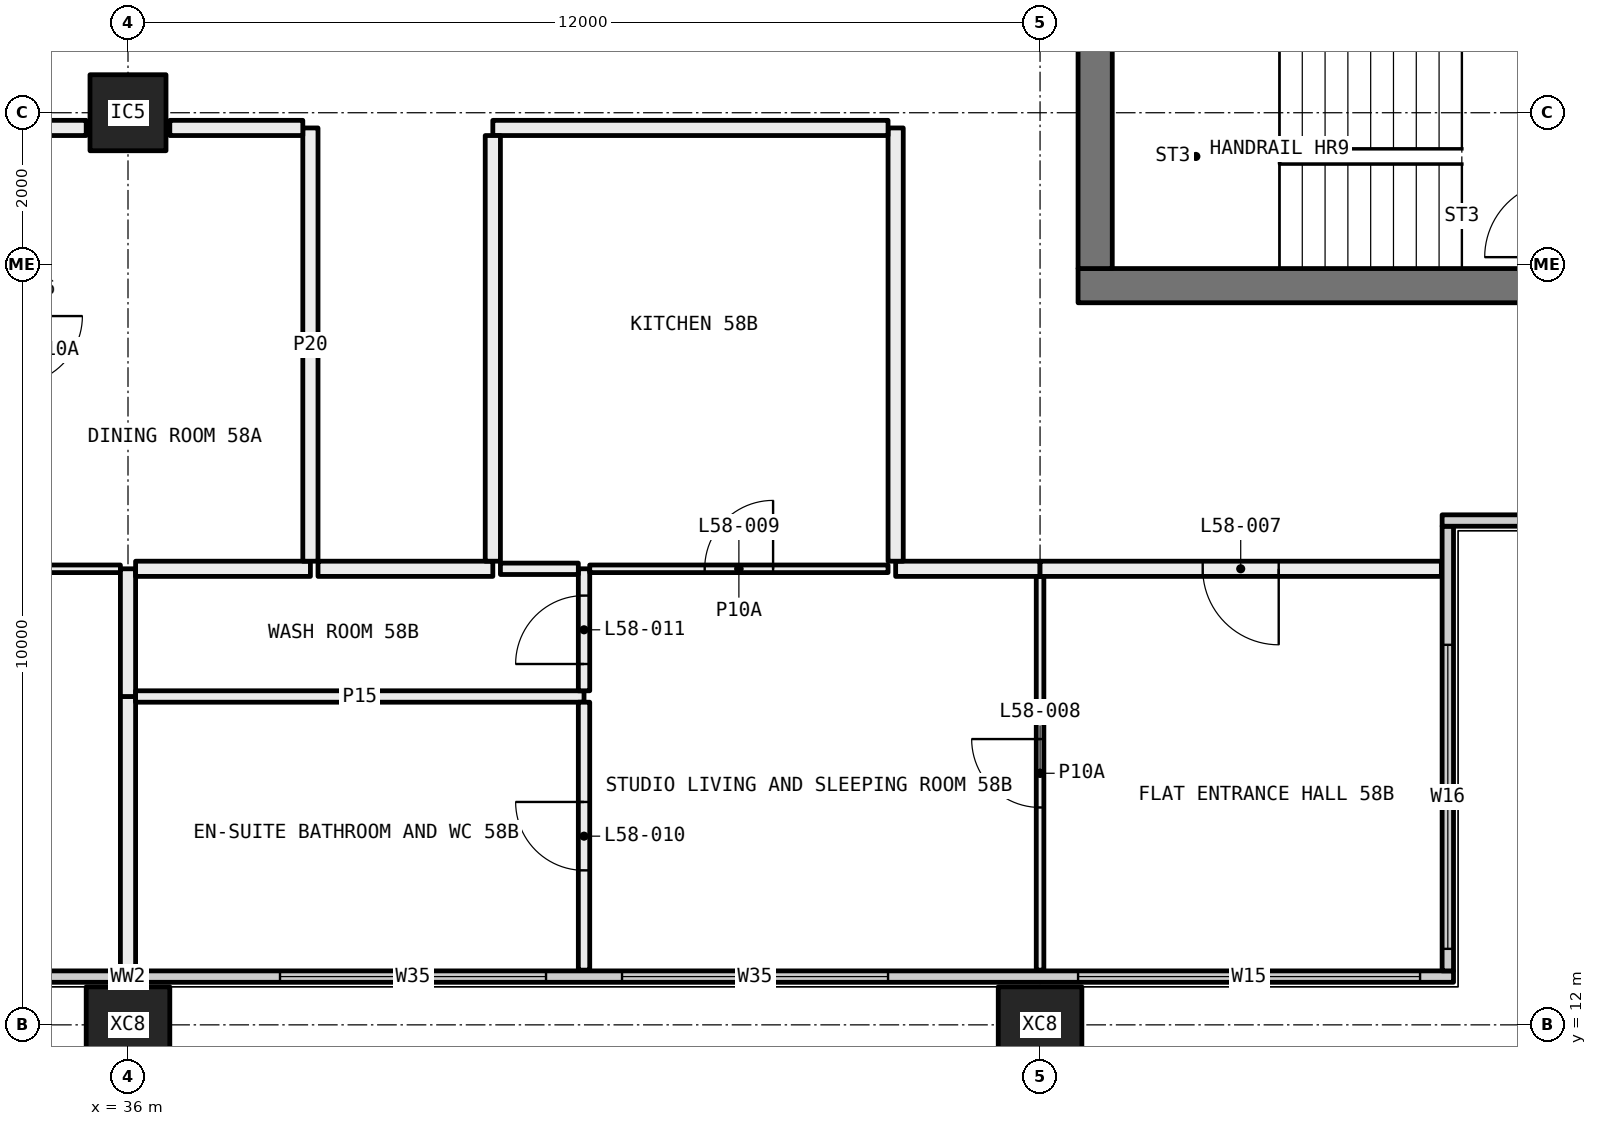
"""IFC4 building model, lengths in metres.
Left out: names, types, materials, properties, quantities, classifications, styles, units other than length and angle.
Written with IfcOpenShell. Run it as: python <this file> out.ifc"""

import sys

from ifc_helpers import new_model, si_unit, direction, frame, frame_2d, origin, origin_2d, place, context, subcontext, project, spatial, rectangle, hollow_rectangle, extrude, element, fill, save


model = new_model("IFC4")
c1 = context("Model", 3, precision=1e-05, world=origin(), true_north=direction((0.0, 1.0)))
c2 = subcontext(c1, "Body", "Model", "MODEL_VIEW")
j1 = project(units=[si_unit("LENGTHUNIT", "METRE"), si_unit("PLANEANGLEUNIT", "RADIAN")], contexts=[c1])
p1 = place(None, origin())
s1 = spatial("IfcSite", under=j1, at=p1, CompositionType="ELEMENT")
p2 = place(p1, origin())
s2 = spatial("IfcBuilding", under=s1, at=p2, CompositionType="ELEMENT")
p3 = place(p2, frame((0.0, 0.0, 217.95)))
s3 = spatial("IfcBuildingStorey", under=s2, at=p3, CompositionType="ELEMENT", Elevation=217.95)
p4 = place(p3, frame((36.0, 12.0, -0.4), z_axis=(0.0, 0.0, 1.0), x_axis=(1.0, 0.0, 0.0)))
e1 = element("IfcColumn", 1, at=p4, inside=s3, PredefinedType="COLUMN", context=c2, shape_type="SweptSolid", body=[
    extrude(hollow_rectangle(XDim=1.1, YDim=1.0, WallThickness=0.04, at=origin_2d()), origin(), (0.0, 0.0, 1.0), 3.45),
])
p5 = place(p3, frame((36.0, 24.0, 0.0), z_axis=(0.0, 0.0, 1.0), x_axis=(1.0, 0.0, 0.0)))
e2 = element("IfcColumn", 2, at=p5, inside=s3, PredefinedType="COLUMN", context=c2, shape_type="SweptSolid", body=[
    extrude(hollow_rectangle(XDim=1.0, YDim=1.0, WallThickness=0.04, at=origin_2d()), origin(), (0.0, 0.0, 1.0), 3.05),
])
p6 = place(p3, frame((48.0, 12.0, -0.4), z_axis=(0.0, 0.0, 1.0), x_axis=(1.0, 0.0, 0.0)))
e3 = element("IfcColumn", 3, at=p6, inside=s3, PredefinedType="COLUMN", context=c2, shape_type="SweptSolid", body=[
    extrude(hollow_rectangle(XDim=1.1, YDim=1.0, WallThickness=0.04, at=origin_2d()), origin(), (0.0, 0.0, 1.0), 3.45),
])
p7 = place(p3, frame((18.56, 12.635, 0.0), z_axis=(0.0, 0.0, 1.0), x_axis=(1.0, 0.0, 0.0)))
e4 = element("IfcWall", 4, at=p7, inside=s3, PredefinedType="ELEMENTEDWALL", context=c2, shape_type="SweptSolid", body=[
    extrude(rectangle(XDim=34.88, YDim=0.15, at=frame_2d((17.44, 0.0))), origin(), (0.0, 0.0, 1.0), 3.05),
])
p8 = place(p7, frame((0.44, 0.0, 0.45)))
e5 = element("IfcOpeningElement", 5, at=p8, cuts=e4, PredefinedType="OPENING", context=c2, shape_type="SweptSolid", body=[
    extrude(rectangle(XDim=4.5, YDim=2.55, at=frame_2d((2.25, 1.275))), frame((0.0, 0.085, 0.0), z_axis=(0.0, -1.0, 0.0), x_axis=(1.0, 0.0, 0.0)), (0.0, 0.0, 1.0), 0.17),
])
p9 = place(p7, frame((7.44, 0.0, 0.45)))
e6 = element("IfcOpeningElement", 6, at=p9, cuts=e4, PredefinedType="OPENING", context=c2, shape_type="SweptSolid", body=[
    extrude(rectangle(XDim=3.5, YDim=2.55, at=frame_2d((1.75, 1.275))), frame((0.0, 0.085, 0.0), z_axis=(0.0, -1.0, 0.0), x_axis=(1.0, 0.0, 0.0)), (0.0, 0.0, 1.0), 0.17),
])
p10 = place(p7, frame((11.94, 0.0, 0.45)))
e7 = element("IfcOpeningElement", 7, at=p10, cuts=e4, PredefinedType="OPENING", context=c2, shape_type="SweptSolid", body=[
    extrude(rectangle(XDim=2.0, YDim=2.55, at=frame_2d((1.0, 1.275))), frame((0.0, 0.085, 0.0), z_axis=(0.0, -1.0, 0.0), x_axis=(1.0, 0.0, 0.0)), (0.0, 0.0, 1.0), 0.17),
])
p11 = place(p7, frame((19.44, 0.0, 0.45)))
e8 = element("IfcOpeningElement", 8, at=p11, cuts=e4, PredefinedType="OPENING", context=c2, shape_type="SweptSolid", body=[
    extrude(rectangle(XDim=3.5, YDim=2.55, at=frame_2d((1.75, 1.275))), frame((0.0, 0.085, 0.0), z_axis=(0.0, -1.0, 0.0), x_axis=(1.0, 0.0, 0.0)), (0.0, 0.0, 1.0), 0.17),
])
p12 = place(p7, frame((23.94, 0.0, 0.45)))
e9 = element("IfcOpeningElement", 9, at=p12, cuts=e4, PredefinedType="OPENING", context=c2, shape_type="SweptSolid", body=[
    extrude(rectangle(XDim=3.5, YDim=2.55, at=frame_2d((1.75, 1.275))), frame((0.0, 0.085, 0.0), z_axis=(0.0, -1.0, 0.0), x_axis=(1.0, 0.0, 0.0)), (0.0, 0.0, 1.0), 0.17),
])
p13 = place(p7, frame((29.94, 0.0, 0.45)))
e10 = element("IfcOpeningElement", 10, at=p13, cuts=e4, PredefinedType="OPENING", context=c2, shape_type="SweptSolid", body=[
    extrude(rectangle(XDim=4.5, YDim=2.55, at=frame_2d((2.25, 1.275))), frame((0.0, 0.085, 0.0), z_axis=(0.0, -1.0, 0.0), x_axis=(1.0, 0.0, 0.0)), (0.0, 0.0, 1.0), 0.17),
])
p14 = place(p3, frame((53.365, 12.71, 0.0), z_axis=(0.0, 0.0, 1.0), x_axis=(0.0, 1.0, 0.0)))
e11 = element("IfcWall", 11, at=p14, inside=s3, PredefinedType="ELEMENTEDWALL", context=c2, shape_type="SweptSolid", body=[
    extrude(rectangle(XDim=5.85, YDim=0.15, at=frame_2d((2.925, 0.0))), origin(), (0.0, 0.0, 1.0), 3.05),
])
p15 = place(p14, frame((0.29, 0.0, 0.45)))
e12 = element("IfcOpeningElement", 12, at=p15, cuts=e11, PredefinedType="OPENING", context=c2, shape_type="SweptSolid", body=[
    extrude(rectangle(XDim=4.0, YDim=2.55, at=frame_2d((2.0, 1.275))), frame((0.0, 0.085, 0.0), z_axis=(0.0, -1.0, 0.0), x_axis=(1.0, 0.0, 0.0)), (0.0, 0.0, 1.0), 0.17),
])
p16 = place(p3, frame((53.29, 18.635, 0.0), z_axis=(0.0, 0.0, 1.0), x_axis=(1.0, 0.0, 0.0)))
e13 = element("IfcWall", 13, at=p16, inside=s3, PredefinedType="ELEMENTEDWALL", context=c2, shape_type="SweptSolid", body=[
    extrude(rectangle(XDim=6.15, YDim=0.15, at=frame_2d((3.075, 0.0))), origin(), (0.0, 0.0, 1.0), 3.05),
])
p17 = place(p16, frame((1.71, 0.0, 0.45)))
e14 = element("IfcOpeningElement", 14, at=p17, cuts=e13, PredefinedType="OPENING", context=c2, shape_type="SweptSolid", body=[
    extrude(rectangle(XDim=4.0, YDim=2.55, at=frame_2d((2.0, 1.275))), frame((0.0, 0.085, 0.0), z_axis=(0.0, -1.0, 0.0), x_axis=(1.0, 0.0, 0.0)), (0.0, 0.0, 1.0), 0.17),
])
p18 = place(p3, frame((35.9, 18.0, 0.0), z_axis=(0.0, 0.0, 1.0), x_axis=(-1.0, 0.0, 0.0)))
e15 = element("IfcWall", 15, at=p18, inside=s3, PredefinedType="PARTITIONING", context=c2, shape_type="SweptSolid", body=[
    extrude(rectangle(XDim=1.4, YDim=0.1, at=frame_2d((0.7, 0.0))), origin(), (0.0, 0.0, 1.0), 3.05),
])
p19 = place(p3, frame((36.0, 12.72, 0.0), z_axis=(0.0, 0.0, 1.0), x_axis=(0.0, 1.0, 0.0)))
e16 = element("IfcWall", 16, at=p19, inside=s3, PredefinedType="PARTITIONING", context=c2, shape_type="SweptSolid", body=[
    extrude(rectangle(XDim=3.6, YDim=0.2, at=frame_2d((1.8, 0.0))), origin(), (0.0, 0.0, 1.0), 2.45),
])
p20 = place(p3, frame((36.0, 16.32, 0.0), z_axis=(0.0, 0.0, 1.0), x_axis=(0.0, 1.0, 0.0)))
e17 = element("IfcWall", 17, at=p20, inside=s3, PredefinedType="PARTITIONING", context=c2, shape_type="SweptSolid", body=[
    extrude(rectangle(XDim=1.68, YDim=0.2, at=frame_2d((0.84, 0.0))), origin(), (0.0, 0.0, 1.0), 2.45),
])
p21 = place(p3, frame((36.1, 18.0, 0.0), z_axis=(0.0, 0.0, 1.0), x_axis=(1.0, 0.0, 0.0)))
e18 = element("IfcWall", 18, at=p21, inside=s3, PredefinedType="PARTITIONING", context=c2, shape_type="SweptSolid", body=[
    extrude(rectangle(XDim=2.3, YDim=0.2, at=frame_2d((1.15, 0.0))), origin(), (0.0, 0.0, 1.0), 3.05),
])
p22 = place(p3, frame((35.45, 23.8, 0.0), z_axis=(0.0, 0.0, 1.0), x_axis=(-1.0, 0.0, 0.0)))
e19 = element("IfcWall", 19, at=p22, inside=s3, PredefinedType="PARTITIONING", context=c2, shape_type="SweptSolid", body=[
    extrude(rectangle(XDim=0.95, YDim=0.2, at=frame_2d((0.475, 0.0))), origin(), (0.0, 0.0, 1.0), 3.05),
])
p23 = place(p3, frame((38.4, 18.1, 0.0), z_axis=(0.0, 0.0, 1.0), x_axis=(0.0, 1.0, 0.0)))
e20 = element("IfcWall", 20, at=p23, inside=s3, PredefinedType="PARTITIONING", context=c2, shape_type="SweptSolid", body=[
    extrude(rectangle(XDim=5.7, YDim=0.2, at=frame_2d((2.85, 0.0))), origin(), (0.0, 0.0, 1.0), 3.05),
])
p24 = place(p3, frame((38.3, 23.8, 0.0), z_axis=(0.0, 0.0, 1.0), x_axis=(-1.0, 0.0, 0.0)))
e21 = element("IfcWall", 21, at=p24, inside=s3, PredefinedType="PARTITIONING", context=c2, shape_type="SweptSolid", body=[
    extrude(rectangle(XDim=1.75, YDim=0.2, at=frame_2d((0.875, 0.0))), origin(), (0.0, 0.0, 1.0), 3.05),
])
p25 = place(p3, frame((42.0, 16.32, 0.0), z_axis=(0.0, 0.0, 1.0), x_axis=(-1.0, 0.0, 0.0)))
e22 = element("IfcWall", 22, at=p25, inside=s3, PredefinedType="PARTITIONING", context=c2, shape_type="SweptSolid", body=[
    extrude(rectangle(XDim=5.9, YDim=0.15, at=frame_2d((2.95, 0.0))), origin(), (0.0, 0.0, 1.0), 3.05),
])
p26 = place(p3, frame((42.0, 12.72, 0.0), z_axis=(0.0, 0.0, 1.0), x_axis=(0.0, 1.0, 0.0)))
e23 = element("IfcWall", 23, at=p26, inside=s3, PredefinedType="PARTITIONING", context=c2, shape_type="SweptSolid", body=[
    extrude(rectangle(XDim=3.525, YDim=0.15, at=frame_2d((1.763, 0.0))), origin(), (0.0, 0.0, 1.0), 3.05),
])
p27 = place(p26, frame((1.312, 0.0, 0.0)))
e24 = element("IfcOpeningElement", 24, at=p27, cuts=e23, PredefinedType="OPENING", context=c2, shape_type="SweptSolid", body=[
    extrude(rectangle(XDim=0.9, YDim=2.1, at=frame_2d((0.45, 1.05))), frame((0.0, 0.085, 0.0), z_axis=(0.0, -1.0, 0.0), x_axis=(1.0, 0.0, 0.0)), (0.0, 0.0, 1.0), 0.17),
])
p28 = place(p3, frame((42.0, 16.395, 0.0), z_axis=(0.0, 0.0, 1.0), x_axis=(0.0, 1.0, 0.0)))
e25 = element("IfcWall", 25, at=p28, inside=s3, PredefinedType="PARTITIONING", context=c2, shape_type="SweptSolid", body=[
    extrude(rectangle(XDim=1.605, YDim=0.15, at=frame_2d((0.802, 0.0))), origin(), (0.0, 0.0, 1.0), 3.05),
])
p29 = place(p28, frame((0.353, 0.0, 0.0)))
e26 = element("IfcOpeningElement", 26, at=p29, cuts=e25, PredefinedType="OPENING", context=c2, shape_type="SweptSolid", body=[
    extrude(rectangle(XDim=0.9, YDim=2.1, at=frame_2d((0.45, 1.05))), frame((0.0, 0.085, 0.0), z_axis=(0.0, -1.0, 0.0), x_axis=(1.0, 0.0, 0.0)), (0.0, 0.0, 1.0), 0.17),
])
p30 = place(p3, frame((41.925, 18.0, 0.0), z_axis=(0.0, 0.0, 1.0), x_axis=(-1.0, 0.0, 0.0)))
e27 = element("IfcWall", 27, at=p30, inside=s3, PredefinedType="PARTITIONING", context=c2, shape_type="SweptSolid", body=[
    extrude(rectangle(XDim=1.025, YDim=0.15, at=frame_2d((0.513, 0.0))), origin(), (0.0, 0.0, 1.0), 3.05),
])
p31 = place(p3, frame((40.8, 18.0, 0.0), z_axis=(0.0, 0.0, 1.0), x_axis=(-1.0, 0.0, 0.0)))
e28 = element("IfcWall", 28, at=p31, inside=s3, PredefinedType="PARTITIONING", context=c2, shape_type="SweptSolid", body=[
    extrude(rectangle(XDim=2.3, YDim=0.2, at=frame_2d((1.15, 0.0))), origin(), (0.0, 0.0, 1.0), 3.05),
])
p32 = place(p3, frame((48.0, 12.72, 0.0), z_axis=(0.0, 0.0, 1.0), x_axis=(0.0, 1.0, 0.0)))
e29 = element("IfcWall", 29, at=p32, inside=s3, PredefinedType="PARTITIONING", context=c2, shape_type="SweptSolid", body=[
    extrude(rectangle(XDim=5.18, YDim=0.1, at=frame_2d((2.59, 0.0))), origin(), (0.0, 0.0, 1.0), 3.05),
])
p33 = place(p32, frame((2.14, 0.0, 0.0)))
e30 = element("IfcOpeningElement", 30, at=p33, cuts=e29, PredefinedType="OPENING", context=c2, shape_type="SweptSolid", body=[
    extrude(rectangle(XDim=0.9, YDim=2.1, at=frame_2d((0.45, 1.05))), frame((0.0, 0.06, 0.0), z_axis=(0.0, -1.0, 0.0), x_axis=(1.0, 0.0, 0.0)), (0.0, 0.0, 1.0), 0.12),
])
p34 = place(p3, frame((46.0, 18.0, 0.0), z_axis=(0.0, 0.0, 1.0), x_axis=(-1.0, 0.0, 0.0)))
e31 = element("IfcWall", 31, at=p34, inside=s3, PredefinedType="PARTITIONING", context=c2, shape_type="SweptSolid", body=[
    extrude(rectangle(XDim=3.925, YDim=0.1, at=frame_2d((1.962, 0.0))), origin(), (0.0, 0.0, 1.0), 3.05),
])
p35 = place(p34, frame((1.512, 0.0, 0.0)))
e32 = element("IfcOpeningElement", 32, at=p35, cuts=e31, PredefinedType="OPENING", context=c2, shape_type="SweptSolid", body=[
    extrude(rectangle(XDim=0.9, YDim=2.1, at=frame_2d((0.45, 1.05))), frame((0.0, 0.06, 0.0), z_axis=(0.0, -1.0, 0.0), x_axis=(1.0, 0.0, 0.0)), (0.0, 0.0, 1.0), 0.12),
])
p36 = place(p3, frame((48.0, 18.0, 0.0), z_axis=(0.0, 0.0, 1.0), x_axis=(-1.0, 0.0, 0.0)))
e33 = element("IfcWall", 33, at=p36, inside=s3, PredefinedType="PARTITIONING", context=c2, shape_type="SweptSolid", body=[
    extrude(rectangle(XDim=1.9, YDim=0.2, at=frame_2d((0.95, 0.0))), origin(), (0.0, 0.0, 1.0), 3.05),
])
p37 = place(p3, frame((53.28, 18.0, 0.0), z_axis=(0.0, 0.0, 1.0), x_axis=(-1.0, 0.0, 0.0)))
e34 = element("IfcWall", 34, at=p37, inside=s3, PredefinedType="PARTITIONING", context=c2, shape_type="SweptSolid", body=[
    extrude(rectangle(XDim=5.28, YDim=0.2, at=frame_2d((2.64, 0.0))), origin(), (0.0, 0.0, 1.0), 3.05),
])
p38 = place(p37, frame((2.14, 0.0, 0.0)))
e35 = element("IfcOpeningElement", 35, at=p38, cuts=e34, PredefinedType="OPENING", context=c2, shape_type="SweptSolid", body=[
    extrude(rectangle(XDim=1.0, YDim=2.1, at=frame_2d((0.5, 1.05))), frame((0.0, 0.11, 0.0), z_axis=(0.0, -1.0, 0.0), x_axis=(1.0, 0.0, 0.0)), (0.0, 0.0, 1.0), 0.22),
])
p39 = place(p3, frame((46.1, 18.1, 0.0), z_axis=(0.0, 0.0, 1.0), x_axis=(0.0, 1.0, 0.0)))
e36 = element("IfcWall", 36, at=p39, inside=s3, PredefinedType="PARTITIONING", context=c2, shape_type="SweptSolid", body=[
    extrude(rectangle(XDim=5.7, YDim=0.2, at=frame_2d((2.85, 0.0))), origin(), (0.0, 0.0, 1.0), 3.05),
])
p40 = place(p3, frame((46.0, 23.8, 0.0), z_axis=(0.0, 0.0, 1.0), x_axis=(-1.0, 0.0, 0.0)))
e37 = element("IfcWall", 37, at=p40, inside=s3, PredefinedType="PARTITIONING", context=c2, shape_type="SweptSolid", body=[
    extrude(rectangle(XDim=5.2, YDim=0.2, at=frame_2d((2.6, 0.0))), origin(), (0.0, 0.0, 1.0), 3.05),
])
p41 = place(p3, frame((40.8, 23.7, 0.0), z_axis=(0.0, 0.0, 1.0), x_axis=(0.0, -1.0, 0.0)))
e38 = element("IfcWall", 38, at=p41, inside=s3, PredefinedType="PARTITIONING", context=c2, shape_type="SweptSolid", body=[
    extrude(rectangle(XDim=5.6, YDim=0.2, at=frame_2d((2.8, 0.0))), origin(), (0.0, 0.0, 1.0), 3.05),
])
p42 = place(p3, frame((59.5, 21.725, 0.0), z_axis=(0.0, 0.0, 1.0), x_axis=(-1.0, 0.0, 0.0)))
e39 = element("IfcWall", 39, at=p42, inside=s3, PredefinedType="SHEAR", context=c2, shape_type="SweptSolid", body=[
    extrude(rectangle(XDim=11.0, YDim=0.45, at=frame_2d((5.5, 0.0))), origin(), (0.0, 0.0, 1.0), 3.05),
])
p43 = place(p42, frame((1.125, 0.0, 0.0)))
e40 = element("IfcOpeningElement", 40, at=p43, cuts=e39, PredefinedType="OPENING", context=c2, shape_type="SweptSolid", body=[
    extrude(rectangle(XDim=1.0, YDim=2.1, at=frame_2d((0.5, 1.05))), frame((0.0, 0.235, 0.0), z_axis=(0.0, -1.0, 0.0), x_axis=(1.0, 0.0, 0.0)), (0.0, 0.0, 1.0), 0.47),
])
p44 = place(p3, frame((48.725, 21.95, 0.0), z_axis=(0.0, 0.0, 1.0), x_axis=(0.0, 1.0, 0.0)))
e41 = element("IfcWall", 41, at=p44, inside=s3, PredefinedType="SHEAR", context=c2, shape_type="SweptSolid", body=[
    extrude(rectangle(XDim=16.1, YDim=0.45, at=frame_2d((8.05, 0.0))), origin(), (0.0, 0.0, 1.0), 3.05),
])
p45 = place(p44, frame((7.25, 0.0, 0.0)))
e42 = element("IfcOpeningElement", 42, at=p45, cuts=e41, PredefinedType="OPENING", context=c2, shape_type="SweptSolid", body=[
    extrude(rectangle(XDim=1.6, YDim=2.1, at=frame_2d((0.8, 1.05))), frame((0.0, 0.235, 0.0), z_axis=(0.0, -1.0, 0.0), x_axis=(1.0, 0.0, 0.0)), (0.0, 0.0, 1.0), 0.47),
])
p46 = place(p11, origin())
e43 = element("IfcWindow", 43, at=p46, inside=s3, PartitioningType="SINGLE_PANEL", PredefinedType="WINDOW", context=c2, shape_type="SweptSolid", body=[
    extrude(rectangle(XDim=3.5, YDim=2.55, at=frame_2d((1.75, 1.275))), frame((0.0, 0.03, 0.0), z_axis=(0.0, -1.0, 0.0), x_axis=(1.0, 0.0, 0.0)), (0.0, 0.0, 1.0), 0.06),
])
fill(e8, e43)
p47 = place(p12, origin())
e44 = element("IfcWindow", 44, at=p47, inside=s3, PartitioningType="SINGLE_PANEL", PredefinedType="WINDOW", context=c2, shape_type="SweptSolid", body=[
    extrude(rectangle(XDim=3.5, YDim=2.55, at=frame_2d((1.75, 1.275))), frame((0.0, 0.03, 0.0), z_axis=(0.0, -1.0, 0.0), x_axis=(1.0, 0.0, 0.0)), (0.0, 0.0, 1.0), 0.06),
])
fill(e9, e44)
p48 = place(p13, origin())
e45 = element("IfcWindow", 45, at=p48, inside=s3, PartitioningType="SINGLE_PANEL", PredefinedType="WINDOW", context=c2, shape_type="SweptSolid", body=[
    extrude(rectangle(XDim=4.5, YDim=2.55, at=frame_2d((2.25, 1.275))), frame((0.0, 0.03, 0.0), z_axis=(0.0, -1.0, 0.0), x_axis=(1.0, 0.0, 0.0)), (0.0, 0.0, 1.0), 0.06),
])
fill(e10, e45)
p49 = place(p15, origin())
e46 = element("IfcWindow", 46, at=p49, inside=s3, PartitioningType="SINGLE_PANEL", PredefinedType="WINDOW", context=c2, shape_type="SweptSolid", body=[
    extrude(rectangle(XDim=4.0, YDim=2.55, at=frame_2d((2.0, 1.275))), frame((0.0, 0.03, 0.0), z_axis=(0.0, -1.0, 0.0), x_axis=(1.0, 0.0, 0.0)), (0.0, 0.0, 1.0), 0.06),
])
fill(e12, e46)
p50 = place(p38, origin())
e47 = element("IfcDoor", 47, at=p50, inside=s3, OperationType="SINGLE_SWING_RIGHT", PredefinedType="DOOR", context=c2, shape_type="SweptSolid", body=[
    extrude(rectangle(XDim=1.0, YDim=2.1, at=frame_2d((0.5, 1.05))), frame((0.0, 0.025, 0.0), z_axis=(0.0, -1.0, 0.0), x_axis=(1.0, 0.0, 0.0)), (0.0, 0.0, 1.0), 0.05),
])
fill(e35, e47)
p51 = place(p33, origin())
e48 = element("IfcDoor", 48, at=p51, inside=s3, OperationType="SINGLE_SWING_LEFT", PredefinedType="DOOR", context=c2, shape_type="SweptSolid", body=[
    extrude(rectangle(XDim=0.9, YDim=2.1, at=frame_2d((0.45, 1.05))), frame((0.0, 0.025, 0.0), z_axis=(0.0, -1.0, 0.0), x_axis=(1.0, 0.0, 0.0)), (0.0, 0.0, 1.0), 0.05),
])
fill(e30, e48)
p52 = place(p35, frame((0.9, 0.0, 0.0), x_axis=(-1.0, 0.0, 0.0)))
e49 = element("IfcDoor", 49, at=p52, inside=s3, OperationType="SINGLE_SWING_LEFT", PredefinedType="DOOR", context=c2, shape_type="SweptSolid", body=[
    extrude(rectangle(XDim=0.9, YDim=2.1, at=frame_2d((0.45, 1.05))), frame((0.0, 0.025, 0.0), z_axis=(0.0, -1.0, 0.0), x_axis=(1.0, 0.0, 0.0)), (0.0, 0.0, 1.0), 0.05),
])
fill(e32, e49)
p53 = place(p27, origin())
e50 = element("IfcDoor", 50, at=p53, inside=s3, OperationType="SINGLE_SWING_LEFT", PredefinedType="DOOR", context=c2, shape_type="SweptSolid", body=[
    extrude(rectangle(XDim=0.9, YDim=2.1, at=frame_2d((0.45, 1.05))), frame((0.0, 0.025, 0.0), z_axis=(0.0, -1.0, 0.0), x_axis=(1.0, 0.0, 0.0)), (0.0, 0.0, 1.0), 0.05),
])
fill(e24, e50)
p54 = place(p29, origin())
e51 = element("IfcDoor", 51, at=p54, inside=s3, OperationType="SINGLE_SWING_RIGHT", PredefinedType="DOOR", context=c2, shape_type="SweptSolid", body=[
    extrude(rectangle(XDim=0.9, YDim=2.1, at=frame_2d((0.45, 1.05))), frame((0.0, 0.025, 0.0), z_axis=(0.0, -1.0, 0.0), x_axis=(1.0, 0.0, 0.0)), (0.0, 0.0, 1.0), 0.05),
])
fill(e26, e51)
save(model, sys.argv[1])
